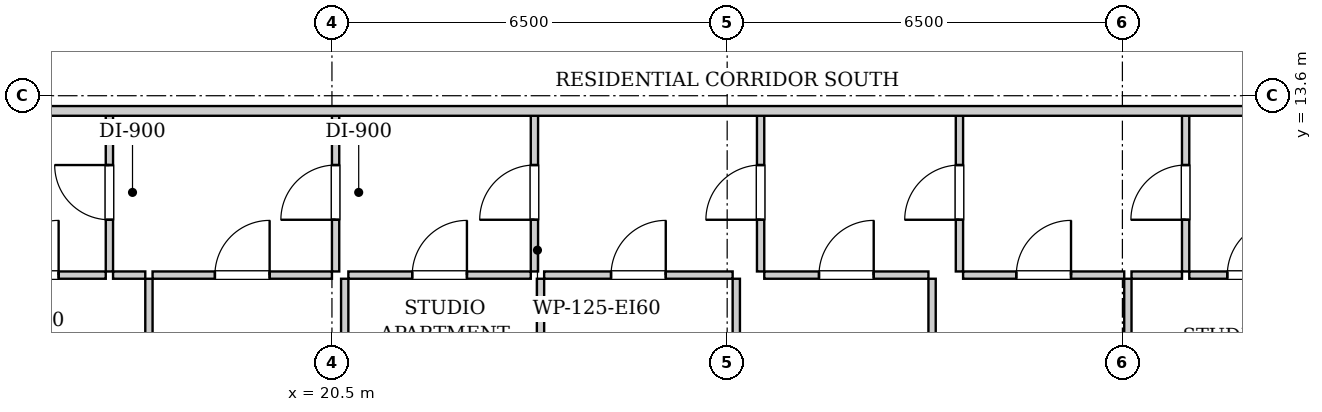
"""IFC4 building model, lengths in metres.
Left out: names, types, materials, properties, quantities, classifications, styles, units other than length and angle.
Written with IfcOpenShell. Run it as: python <this file> out.ifc"""

import sys

from ifc_helpers import new_model, si_unit, direction, frame, frame_2d, origin, place, context, subcontext, project, spatial, rectangle, extrude, element, fill, save


model = new_model("IFC4")
c1 = context("Model", 3, precision=1e-05, world=origin(), true_north=direction((0.0, 1.0)))
c2 = subcontext(c1, "Body", "Model", "MODEL_VIEW")
j1 = project(units=[si_unit("LENGTHUNIT", "METRE"), si_unit("PLANEANGLEUNIT", "RADIAN")], contexts=[c1])
p1 = place(None, origin())
s1 = spatial("IfcSite", under=j1, at=p1, CompositionType="ELEMENT")
p2 = place(p1, origin())
s2 = spatial("IfcBuilding", under=s1, at=p2, CompositionType="ELEMENT")
p3 = place(p2, frame((0.0, 0.0, 25.8)))
s3 = spatial("IfcBuildingStorey", under=s2, at=p3, CompositionType="ELEMENT", Elevation=25.8)
p4 = place(p3, frame((16.84, 10.71, 0.0), z_axis=(0.0, 0.0, 1.0), x_axis=(0.0, 1.0, 0.0)))
e1 = element("IfcWall", 1, at=p4, inside=s3, PredefinedType="PARTITIONING", context=c2, shape_type="SweptSolid", body=[
    extrude(rectangle(XDim=2.6, YDim=0.12, at=frame_2d((1.3, 0.0))), origin(), (0.0, 0.0, 1.0), 2.94),
])
p5 = place(p4, frame((0.85, 0.0, 0.0)))
e2 = element("IfcOpeningElement", 2, at=p5, cuts=e1, PredefinedType="OPENING", context=c2, shape_type="SweptSolid", body=[
    extrude(rectangle(XDim=0.9, YDim=2.05, at=frame_2d((0.45, 1.025))), frame((0.0, 0.07, 0.0), z_axis=(0.0, -1.0, 0.0), x_axis=(1.0, 0.0, 0.0)), (0.0, 0.0, 1.0), 0.14),
])
p6 = place(p3, frame((14.33, 10.65, 0.0), z_axis=(0.0, 0.0, 1.0), x_axis=(1.0, 0.0, 0.0)))
e3 = element("IfcWall", 3, at=p6, inside=s3, PredefinedType="PARTITIONING", context=c2, shape_type="SweptSolid", body=[
    extrude(rectangle(XDim=2.45, YDim=0.12, at=frame_2d((1.225, 0.0))), origin(), (0.0, 0.0, 1.0), 2.94),
])
p7 = place(p6, frame((0.775, 0.0, 0.0)))
e4 = element("IfcOpeningElement", 4, at=p7, cuts=e3, PredefinedType="OPENING", context=c2, shape_type="SweptSolid", body=[
    extrude(rectangle(XDim=0.9, YDim=2.05, at=frame_2d((0.45, 1.025))), frame((0.0, 0.07, 0.0), z_axis=(0.0, -1.0, 0.0), x_axis=(1.0, 0.0, 0.0)), (0.0, 0.0, 1.0), 0.14),
])
p8 = place(p3, frame((20.56, 10.71, 0.0), z_axis=(0.0, 0.0, 1.0), x_axis=(0.0, 1.0, 0.0)))
e5 = element("IfcWall", 5, at=p8, inside=s3, PredefinedType="PARTITIONING", context=c2, shape_type="SweptSolid", body=[
    extrude(rectangle(XDim=2.6, YDim=0.12, at=frame_2d((1.3, 0.0))), origin(), (0.0, 0.0, 1.0), 2.94),
])
p9 = place(p8, frame((0.85, 0.0, 0.0)))
e6 = element("IfcOpeningElement", 6, at=p9, cuts=e5, PredefinedType="OPENING", context=c2, shape_type="SweptSolid", body=[
    extrude(rectangle(XDim=0.9, YDim=2.05, at=frame_2d((0.45, 1.025))), frame((0.0, 0.07, 0.0), z_axis=(0.0, -1.0, 0.0), x_axis=(1.0, 0.0, 0.0)), (0.0, 0.0, 1.0), 0.14),
])
p10 = place(p3, frame((16.9, 10.65, 0.0), z_axis=(0.0, 0.0, 1.0), x_axis=(1.0, 0.0, 0.0)))
e7 = element("IfcWall", 7, at=p10, inside=s3, PredefinedType="PARTITIONING", context=c2, shape_type="SweptSolid", body=[
    extrude(rectangle(XDim=0.53, YDim=0.12, at=frame_2d((0.265, 0.0))), origin(), (0.0, 0.0, 1.0), 2.94),
])
p11 = place(p3, frame((17.55, 10.65, 0.0), z_axis=(0.0, 0.0, 1.0), x_axis=(1.0, 0.0, 0.0)))
e8 = element("IfcWall", 8, at=p11, inside=s3, PredefinedType="PARTITIONING", context=c2, shape_type="SweptSolid", body=[
    extrude(rectangle(XDim=2.95, YDim=0.12, at=frame_2d((1.475, 0.0))), origin(), (0.0, 0.0, 1.0), 2.94),
])
p12 = place(p11, frame((1.025, 0.0, 0.0)))
e9 = element("IfcOpeningElement", 9, at=p12, cuts=e8, PredefinedType="OPENING", context=c2, shape_type="SweptSolid", body=[
    extrude(rectangle(XDim=0.9, YDim=2.05, at=frame_2d((0.45, 1.025))), frame((0.0, 0.07, 0.0), z_axis=(0.0, -1.0, 0.0), x_axis=(1.0, 0.0, 0.0)), (0.0, 0.0, 1.0), 0.14),
])
p13 = place(p3, frame((23.83, 10.71, 0.0), z_axis=(0.0, 0.0, 1.0), x_axis=(0.0, 1.0, 0.0)))
e10 = element("IfcWall", 10, at=p13, inside=s3, PredefinedType="PARTITIONING", context=c2, shape_type="SweptSolid", body=[
    extrude(rectangle(XDim=2.6, YDim=0.12, at=frame_2d((1.3, 0.0))), origin(), (0.0, 0.0, 1.0), 2.94),
])
p14 = place(p13, frame((0.85, 0.0, 0.0)))
e11 = element("IfcOpeningElement", 11, at=p14, cuts=e10, PredefinedType="OPENING", context=c2, shape_type="SweptSolid", body=[
    extrude(rectangle(XDim=0.9, YDim=2.05, at=frame_2d((0.45, 1.025))), frame((0.0, 0.07, 0.0), z_axis=(0.0, -1.0, 0.0), x_axis=(1.0, 0.0, 0.0)), (0.0, 0.0, 1.0), 0.14),
])
p15 = place(p3, frame((20.77, 10.65, 0.0), z_axis=(0.0, 0.0, 1.0), x_axis=(1.0, 0.0, 0.0)))
e12 = element("IfcWall", 12, at=p15, inside=s3, PredefinedType="PARTITIONING", context=c2, shape_type="SweptSolid", body=[
    extrude(rectangle(XDim=3.0, YDim=0.12, at=frame_2d((1.5, 0.0))), origin(), (0.0, 0.0, 1.0), 2.94),
])
p16 = place(p15, frame((1.05, 0.0, 0.0)))
e13 = element("IfcOpeningElement", 13, at=p16, cuts=e12, PredefinedType="OPENING", context=c2, shape_type="SweptSolid", body=[
    extrude(rectangle(XDim=0.9, YDim=2.05, at=frame_2d((0.45, 1.025))), frame((0.0, 0.07, 0.0), z_axis=(0.0, -1.0, 0.0), x_axis=(1.0, 0.0, 0.0)), (0.0, 0.0, 1.0), 0.14),
])
p17 = place(p3, frame((27.55, 10.71, 0.0), z_axis=(0.0, 0.0, 1.0), x_axis=(0.0, 1.0, 0.0)))
e14 = element("IfcWall", 14, at=p17, inside=s3, PredefinedType="PARTITIONING", context=c2, shape_type="SweptSolid", body=[
    extrude(rectangle(XDim=2.6, YDim=0.12, at=frame_2d((1.3, 0.0))), origin(), (0.0, 0.0, 1.0), 2.94),
])
p18 = place(p17, frame((0.85, 0.0, 0.0)))
e15 = element("IfcOpeningElement", 15, at=p18, cuts=e14, PredefinedType="OPENING", context=c2, shape_type="SweptSolid", body=[
    extrude(rectangle(XDim=0.9, YDim=2.05, at=frame_2d((0.45, 1.025))), frame((0.0, 0.07, 0.0), z_axis=(0.0, -1.0, 0.0), x_axis=(1.0, 0.0, 0.0)), (0.0, 0.0, 1.0), 0.14),
])
p19 = place(p3, frame((23.99, 10.65, 0.0), z_axis=(0.0, 0.0, 1.0), x_axis=(1.0, 0.0, 0.0)))
e16 = element("IfcWall", 16, at=p19, inside=s3, PredefinedType="PARTITIONING", context=c2, shape_type="SweptSolid", body=[
    extrude(rectangle(XDim=3.1, YDim=0.12, at=frame_2d((1.55, 0.0))), origin(), (0.0, 0.0, 1.0), 2.94),
])
p20 = place(p19, frame((1.1, 0.0, 0.0)))
e17 = element("IfcOpeningElement", 17, at=p20, cuts=e16, PredefinedType="OPENING", context=c2, shape_type="SweptSolid", body=[
    extrude(rectangle(XDim=0.9, YDim=2.05, at=frame_2d((0.45, 1.025))), frame((0.0, 0.07, 0.0), z_axis=(0.0, -1.0, 0.0), x_axis=(1.0, 0.0, 0.0)), (0.0, 0.0, 1.0), 0.14),
])
p21 = place(p3, frame((30.82, 10.71, 0.0), z_axis=(0.0, 0.0, 1.0), x_axis=(0.0, 1.0, 0.0)))
e18 = element("IfcWall", 18, at=p21, inside=s3, PredefinedType="PARTITIONING", context=c2, shape_type="SweptSolid", body=[
    extrude(rectangle(XDim=2.6, YDim=0.12, at=frame_2d((1.3, 0.0))), origin(), (0.0, 0.0, 1.0), 2.94),
])
p22 = place(p21, frame((0.85, 0.0, 0.0)))
e19 = element("IfcOpeningElement", 19, at=p22, cuts=e18, PredefinedType="OPENING", context=c2, shape_type="SweptSolid", body=[
    extrude(rectangle(XDim=0.9, YDim=2.05, at=frame_2d((0.45, 1.025))), frame((0.0, 0.07, 0.0), z_axis=(0.0, -1.0, 0.0), x_axis=(1.0, 0.0, 0.0)), (0.0, 0.0, 1.0), 0.14),
])
p23 = place(p3, frame((27.61, 10.65, 0.0), z_axis=(0.0, 0.0, 1.0), x_axis=(1.0, 0.0, 0.0)))
e20 = element("IfcWall", 20, at=p23, inside=s3, PredefinedType="PARTITIONING", context=c2, shape_type="SweptSolid", body=[
    extrude(rectangle(XDim=2.7, YDim=0.12, at=frame_2d((1.35, 0.0))), origin(), (0.0, 0.0, 1.0), 2.94),
])
p24 = place(p23, frame((0.9, 0.0, 0.0)))
e21 = element("IfcOpeningElement", 21, at=p24, cuts=e20, PredefinedType="OPENING", context=c2, shape_type="SweptSolid", body=[
    extrude(rectangle(XDim=0.9, YDim=2.05, at=frame_2d((0.45, 1.025))), frame((0.0, 0.07, 0.0), z_axis=(0.0, -1.0, 0.0), x_axis=(1.0, 0.0, 0.0)), (0.0, 0.0, 1.0), 0.14),
])
p25 = place(p3, frame((34.54, 10.71, 0.0), z_axis=(0.0, 0.0, 1.0), x_axis=(0.0, 1.0, 0.0)))
e22 = element("IfcWall", 22, at=p25, inside=s3, PredefinedType="PARTITIONING", context=c2, shape_type="SweptSolid", body=[
    extrude(rectangle(XDim=2.6, YDim=0.12, at=frame_2d((1.3, 0.0))), origin(), (0.0, 0.0, 1.0), 2.94),
])
p26 = place(p25, frame((0.85, 0.0, 0.0)))
e23 = element("IfcOpeningElement", 23, at=p26, cuts=e22, PredefinedType="OPENING", context=c2, shape_type="SweptSolid", body=[
    extrude(rectangle(XDim=0.9, YDim=2.05, at=frame_2d((0.45, 1.025))), frame((0.0, 0.07, 0.0), z_axis=(0.0, -1.0, 0.0), x_axis=(1.0, 0.0, 0.0)), (0.0, 0.0, 1.0), 0.14),
])
p27 = place(p3, frame((30.88, 10.65, 0.0), z_axis=(0.0, 0.0, 1.0), x_axis=(1.0, 0.0, 0.0)))
e24 = element("IfcWall", 24, at=p27, inside=s3, PredefinedType="PARTITIONING", context=c2, shape_type="SweptSolid", body=[
    extrude(rectangle(XDim=2.65, YDim=0.12, at=frame_2d((1.325, 0.0))), origin(), (0.0, 0.0, 1.0), 2.94),
])
p28 = place(p27, frame((0.875, 0.0, 0.0)))
e25 = element("IfcOpeningElement", 25, at=p28, cuts=e24, PredefinedType="OPENING", context=c2, shape_type="SweptSolid", body=[
    extrude(rectangle(XDim=0.9, YDim=2.05, at=frame_2d((0.45, 1.025))), frame((0.0, 0.07, 0.0), z_axis=(0.0, -1.0, 0.0), x_axis=(1.0, 0.0, 0.0)), (0.0, 0.0, 1.0), 0.14),
])
p29 = place(p3, frame((33.65, 10.65, 0.0), z_axis=(0.0, 0.0, 1.0), x_axis=(1.0, 0.0, 0.0)))
e26 = element("IfcWall", 26, at=p29, inside=s3, PredefinedType="PARTITIONING", context=c2, shape_type="SweptSolid", body=[
    extrude(rectangle(XDim=0.83, YDim=0.12, at=frame_2d((0.415, 0.0))), origin(), (0.0, 0.0, 1.0), 2.94),
])
p30 = place(p3, frame((34.6, 10.65, 0.0), z_axis=(0.0, 0.0, 1.0), x_axis=(1.0, 0.0, 0.0)))
e27 = element("IfcWall", 27, at=p30, inside=s3, PredefinedType="PARTITIONING", context=c2, shape_type="SweptSolid", body=[
    extrude(rectangle(XDim=2.15, YDim=0.12, at=frame_2d((1.075, 0.0))), origin(), (0.0, 0.0, 1.0), 2.94),
])
p31 = place(p30, frame((0.625, 0.0, 0.0)))
e28 = element("IfcOpeningElement", 28, at=p31, cuts=e27, PredefinedType="OPENING", context=c2, shape_type="SweptSolid", body=[
    extrude(rectangle(XDim=0.9, YDim=2.05, at=frame_2d((0.45, 1.025))), frame((0.0, 0.07, 0.0), z_axis=(0.0, -1.0, 0.0), x_axis=(1.0, 0.0, 0.0)), (0.0, 0.0, 1.0), 0.14),
])
p32 = place(p3, frame((17.49, 0.28, 0.0), z_axis=(0.0, 0.0, 1.0), x_axis=(0.0, 1.0, 0.0)))
e29 = element("IfcWall", 29, at=p32, inside=s3, PredefinedType="PARTITIONING", context=c2, shape_type="SweptSolid", body=[
    extrude(rectangle(XDim=10.31, YDim=0.12, at=frame_2d((5.155, 0.0))), origin(), (0.0, 0.0, 1.0), 2.94),
])
p33 = place(p32, frame((4.69, 0.0, 0.0)))
e30 = element("IfcOpeningElement", 30, at=p33, cuts=e29, PredefinedType="OPENING", context=c2, shape_type="SweptSolid", body=[
    extrude(rectangle(XDim=0.9, YDim=2.05, at=frame_2d((0.45, 1.025))), frame((0.0, 0.07, 0.0), z_axis=(0.0, -1.0, 0.0), x_axis=(1.0, 0.0, 0.0)), (0.0, 0.0, 1.0), 0.14),
])
p34 = place(p3, frame((20.71, 0.28, 0.0), z_axis=(0.0, 0.0, 1.0), x_axis=(0.0, 1.0, 0.0)))
e31 = element("IfcWall", 31, at=p34, inside=s3, PredefinedType="PARTITIONING", context=c2, shape_type="SweptSolid", body=[
    extrude(rectangle(XDim=10.31, YDim=0.12, at=frame_2d((5.155, 0.0))), origin(), (0.0, 0.0, 1.0), 2.94),
])
p35 = place(p34, frame((4.69, 0.0, 0.0)))
e32 = element("IfcOpeningElement", 32, at=p35, cuts=e31, PredefinedType="OPENING", context=c2, shape_type="SweptSolid", body=[
    extrude(rectangle(XDim=0.9, YDim=2.05, at=frame_2d((0.45, 1.025))), frame((0.0, 0.07, 0.0), z_axis=(0.0, -1.0, 0.0), x_axis=(1.0, 0.0, 0.0)), (0.0, 0.0, 1.0), 0.14),
])
p36 = place(p3, frame((23.93, 0.28, 0.0), z_axis=(0.0, 0.0, 1.0), x_axis=(0.0, 1.0, 0.0)))
e33 = element("IfcWall", 33, at=p36, inside=s3, PredefinedType="PARTITIONING", context=c2, shape_type="SweptSolid", body=[
    extrude(rectangle(XDim=10.31, YDim=0.12, at=frame_2d((5.155, 0.0))), origin(), (0.0, 0.0, 1.0), 2.94),
])
p37 = place(p36, frame((4.69, 0.0, 0.0)))
e34 = element("IfcOpeningElement", 34, at=p37, cuts=e33, PredefinedType="OPENING", context=c2, shape_type="SweptSolid", body=[
    extrude(rectangle(XDim=0.9, YDim=2.05, at=frame_2d((0.45, 1.025))), frame((0.0, 0.07, 0.0), z_axis=(0.0, -1.0, 0.0), x_axis=(1.0, 0.0, 0.0)), (0.0, 0.0, 1.0), 0.14),
])
p38 = place(p3, frame((27.15, 0.28, 0.0), z_axis=(0.0, 0.0, 1.0), x_axis=(0.0, 1.0, 0.0)))
e35 = element("IfcWall", 35, at=p38, inside=s3, PredefinedType="PARTITIONING", context=c2, shape_type="SweptSolid", body=[
    extrude(rectangle(XDim=10.31, YDim=0.12, at=frame_2d((5.155, 0.0))), origin(), (0.0, 0.0, 1.0), 2.94),
])
p39 = place(p38, frame((4.69, 0.0, 0.0)))
e36 = element("IfcOpeningElement", 36, at=p39, cuts=e35, PredefinedType="OPENING", context=c2, shape_type="SweptSolid", body=[
    extrude(rectangle(XDim=0.9, YDim=2.05, at=frame_2d((0.45, 1.025))), frame((0.0, 0.07, 0.0), z_axis=(0.0, -1.0, 0.0), x_axis=(1.0, 0.0, 0.0)), (0.0, 0.0, 1.0), 0.14),
])
p40 = place(p3, frame((30.37, 0.28, 0.0), z_axis=(0.0, 0.0, 1.0), x_axis=(0.0, 1.0, 0.0)))
e37 = element("IfcWall", 37, at=p40, inside=s3, PredefinedType="PARTITIONING", context=c2, shape_type="SweptSolid", body=[
    extrude(rectangle(XDim=10.31, YDim=0.12, at=frame_2d((5.155, 0.0))), origin(), (0.0, 0.0, 1.0), 2.94),
])
p41 = place(p40, frame((4.69, 0.0, 0.0)))
e38 = element("IfcOpeningElement", 38, at=p41, cuts=e37, PredefinedType="OPENING", context=c2, shape_type="SweptSolid", body=[
    extrude(rectangle(XDim=0.9, YDim=2.05, at=frame_2d((0.45, 1.025))), frame((0.0, 0.07, 0.0), z_axis=(0.0, -1.0, 0.0), x_axis=(1.0, 0.0, 0.0)), (0.0, 0.0, 1.0), 0.14),
])
p42 = place(p3, frame((33.59, 0.28, 0.0), z_axis=(0.0, 0.0, 1.0), x_axis=(0.0, 1.0, 0.0)))
e39 = element("IfcWall", 39, at=p42, inside=s3, PredefinedType="PARTITIONING", context=c2, shape_type="SweptSolid", body=[
    extrude(rectangle(XDim=10.31, YDim=0.12, at=frame_2d((5.155, 0.0))), origin(), (0.0, 0.0, 1.0), 2.94),
])
p43 = place(p42, frame((4.69, 0.0, 0.0)))
e40 = element("IfcOpeningElement", 40, at=p43, cuts=e39, PredefinedType="OPENING", context=c2, shape_type="SweptSolid", body=[
    extrude(rectangle(XDim=0.9, YDim=2.05, at=frame_2d((0.45, 1.025))), frame((0.0, 0.07, 0.0), z_axis=(0.0, -1.0, 0.0), x_axis=(1.0, 0.0, 0.0)), (0.0, 0.0, 1.0), 0.14),
])
p44 = place(p3, frame((10.05, 13.35, 0.0), z_axis=(0.0, 0.0, 1.0), x_axis=(1.0, 0.0, 0.0)))
e41 = element("IfcWall", 41, at=p44, inside=s3, PredefinedType="PARTITIONING", context=c2, shape_type="SweptSolid", body=[
    extrude(rectangle(XDim=33.9, YDim=0.16, at=frame_2d((16.95, 0.0))), origin(), (0.0, 0.0, 1.0), 2.94),
])
p45 = place(p44, frame((4.165, 0.0, 0.0)))
e42 = element("IfcOpeningElement", 42, at=p45, cuts=e41, PredefinedType="OPENING", context=c2, shape_type="SweptSolid", body=[
    extrude(rectangle(XDim=0.95, YDim=2.1, at=frame_2d((0.475, 1.05))), frame((0.0, 0.09, 0.0), z_axis=(0.0, -1.0, 0.0), x_axis=(1.0, 0.0, 0.0)), (0.0, 0.0, 1.0), 0.18),
])
p46 = place(p5, origin())
e43 = element("IfcDoor", 43, at=p46, inside=s3, OperationType="SINGLE_SWING_RIGHT", PredefinedType="DOOR", context=c2, shape_type="SweptSolid", body=[
    extrude(rectangle(XDim=0.9, YDim=2.05, at=frame_2d((0.45, 1.025))), frame((0.0, 0.025, 0.0), z_axis=(0.0, -1.0, 0.0), x_axis=(1.0, 0.0, 0.0)), (0.0, 0.0, 1.0), 0.05),
])
fill(e2, e43)
p47 = place(p7, origin())
e44 = element("IfcDoor", 44, at=p47, inside=s3, OperationType="SINGLE_SWING_RIGHT", PredefinedType="DOOR", context=c2, shape_type="SweptSolid", body=[
    extrude(rectangle(XDim=0.9, YDim=2.05, at=frame_2d((0.45, 1.025))), frame((0.0, 0.025, 0.0), z_axis=(0.0, -1.0, 0.0), x_axis=(1.0, 0.0, 0.0)), (0.0, 0.0, 1.0), 0.05),
])
fill(e4, e44)
p48 = place(p9, origin())
e45 = element("IfcDoor", 45, at=p48, inside=s3, OperationType="SINGLE_SWING_LEFT", PredefinedType="DOOR", context=c2, shape_type="SweptSolid", body=[
    extrude(rectangle(XDim=0.9, YDim=2.05, at=frame_2d((0.45, 1.025))), frame((0.0, 0.025, 0.0), z_axis=(0.0, -1.0, 0.0), x_axis=(1.0, 0.0, 0.0)), (0.0, 0.0, 1.0), 0.05),
])
fill(e6, e45)
p49 = place(p12, origin())
e46 = element("IfcDoor", 46, at=p49, inside=s3, OperationType="SINGLE_SWING_RIGHT", PredefinedType="DOOR", context=c2, shape_type="SweptSolid", body=[
    extrude(rectangle(XDim=0.9, YDim=2.05, at=frame_2d((0.45, 1.025))), frame((0.0, 0.025, 0.0), z_axis=(0.0, -1.0, 0.0), x_axis=(1.0, 0.0, 0.0)), (0.0, 0.0, 1.0), 0.05),
])
fill(e9, e46)
p50 = place(p14, origin())
e47 = element("IfcDoor", 47, at=p50, inside=s3, OperationType="SINGLE_SWING_LEFT", PredefinedType="DOOR", context=c2, shape_type="SweptSolid", body=[
    extrude(rectangle(XDim=0.9, YDim=2.05, at=frame_2d((0.45, 1.025))), frame((0.0, 0.025, 0.0), z_axis=(0.0, -1.0, 0.0), x_axis=(1.0, 0.0, 0.0)), (0.0, 0.0, 1.0), 0.05),
])
fill(e11, e47)
p51 = place(p16, origin())
e48 = element("IfcDoor", 48, at=p51, inside=s3, OperationType="SINGLE_SWING_RIGHT", PredefinedType="DOOR", context=c2, shape_type="SweptSolid", body=[
    extrude(rectangle(XDim=0.9, YDim=2.05, at=frame_2d((0.45, 1.025))), frame((0.0, 0.025, 0.0), z_axis=(0.0, -1.0, 0.0), x_axis=(1.0, 0.0, 0.0)), (0.0, 0.0, 1.0), 0.05),
])
fill(e13, e48)
p52 = place(p18, origin())
e49 = element("IfcDoor", 49, at=p52, inside=s3, OperationType="SINGLE_SWING_LEFT", PredefinedType="DOOR", context=c2, shape_type="SweptSolid", body=[
    extrude(rectangle(XDim=0.9, YDim=2.05, at=frame_2d((0.45, 1.025))), frame((0.0, 0.025, 0.0), z_axis=(0.0, -1.0, 0.0), x_axis=(1.0, 0.0, 0.0)), (0.0, 0.0, 1.0), 0.05),
])
fill(e15, e49)
p53 = place(p20, origin())
e50 = element("IfcDoor", 50, at=p53, inside=s3, OperationType="SINGLE_SWING_RIGHT", PredefinedType="DOOR", context=c2, shape_type="SweptSolid", body=[
    extrude(rectangle(XDim=0.9, YDim=2.05, at=frame_2d((0.45, 1.025))), frame((0.0, 0.025, 0.0), z_axis=(0.0, -1.0, 0.0), x_axis=(1.0, 0.0, 0.0)), (0.0, 0.0, 1.0), 0.05),
])
fill(e17, e50)
p54 = place(p22, origin())
e51 = element("IfcDoor", 51, at=p54, inside=s3, OperationType="SINGLE_SWING_LEFT", PredefinedType="DOOR", context=c2, shape_type="SweptSolid", body=[
    extrude(rectangle(XDim=0.9, YDim=2.05, at=frame_2d((0.45, 1.025))), frame((0.0, 0.025, 0.0), z_axis=(0.0, -1.0, 0.0), x_axis=(1.0, 0.0, 0.0)), (0.0, 0.0, 1.0), 0.05),
])
fill(e19, e51)
p55 = place(p24, origin())
e52 = element("IfcDoor", 52, at=p55, inside=s3, OperationType="SINGLE_SWING_RIGHT", PredefinedType="DOOR", context=c2, shape_type="SweptSolid", body=[
    extrude(rectangle(XDim=0.9, YDim=2.05, at=frame_2d((0.45, 1.025))), frame((0.0, 0.025, 0.0), z_axis=(0.0, -1.0, 0.0), x_axis=(1.0, 0.0, 0.0)), (0.0, 0.0, 1.0), 0.05),
])
fill(e21, e52)
p56 = place(p26, origin())
e53 = element("IfcDoor", 53, at=p56, inside=s3, OperationType="SINGLE_SWING_LEFT", PredefinedType="DOOR", context=c2, shape_type="SweptSolid", body=[
    extrude(rectangle(XDim=0.9, YDim=2.05, at=frame_2d((0.45, 1.025))), frame((0.0, 0.025, 0.0), z_axis=(0.0, -1.0, 0.0), x_axis=(1.0, 0.0, 0.0)), (0.0, 0.0, 1.0), 0.05),
])
fill(e23, e53)
p57 = place(p28, origin())
e54 = element("IfcDoor", 54, at=p57, inside=s3, OperationType="SINGLE_SWING_RIGHT", PredefinedType="DOOR", context=c2, shape_type="SweptSolid", body=[
    extrude(rectangle(XDim=0.9, YDim=2.05, at=frame_2d((0.45, 1.025))), frame((0.0, 0.025, 0.0), z_axis=(0.0, -1.0, 0.0), x_axis=(1.0, 0.0, 0.0)), (0.0, 0.0, 1.0), 0.05),
])
fill(e25, e54)
p58 = place(p31, origin())
e55 = element("IfcDoor", 55, at=p58, inside=s3, OperationType="SINGLE_SWING_RIGHT", PredefinedType="DOOR", context=c2, shape_type="SweptSolid", body=[
    extrude(rectangle(XDim=0.9, YDim=2.05, at=frame_2d((0.45, 1.025))), frame((0.0, 0.025, 0.0), z_axis=(0.0, -1.0, 0.0), x_axis=(1.0, 0.0, 0.0)), (0.0, 0.0, 1.0), 0.05),
])
fill(e28, e55)
save(model, sys.argv[1])
